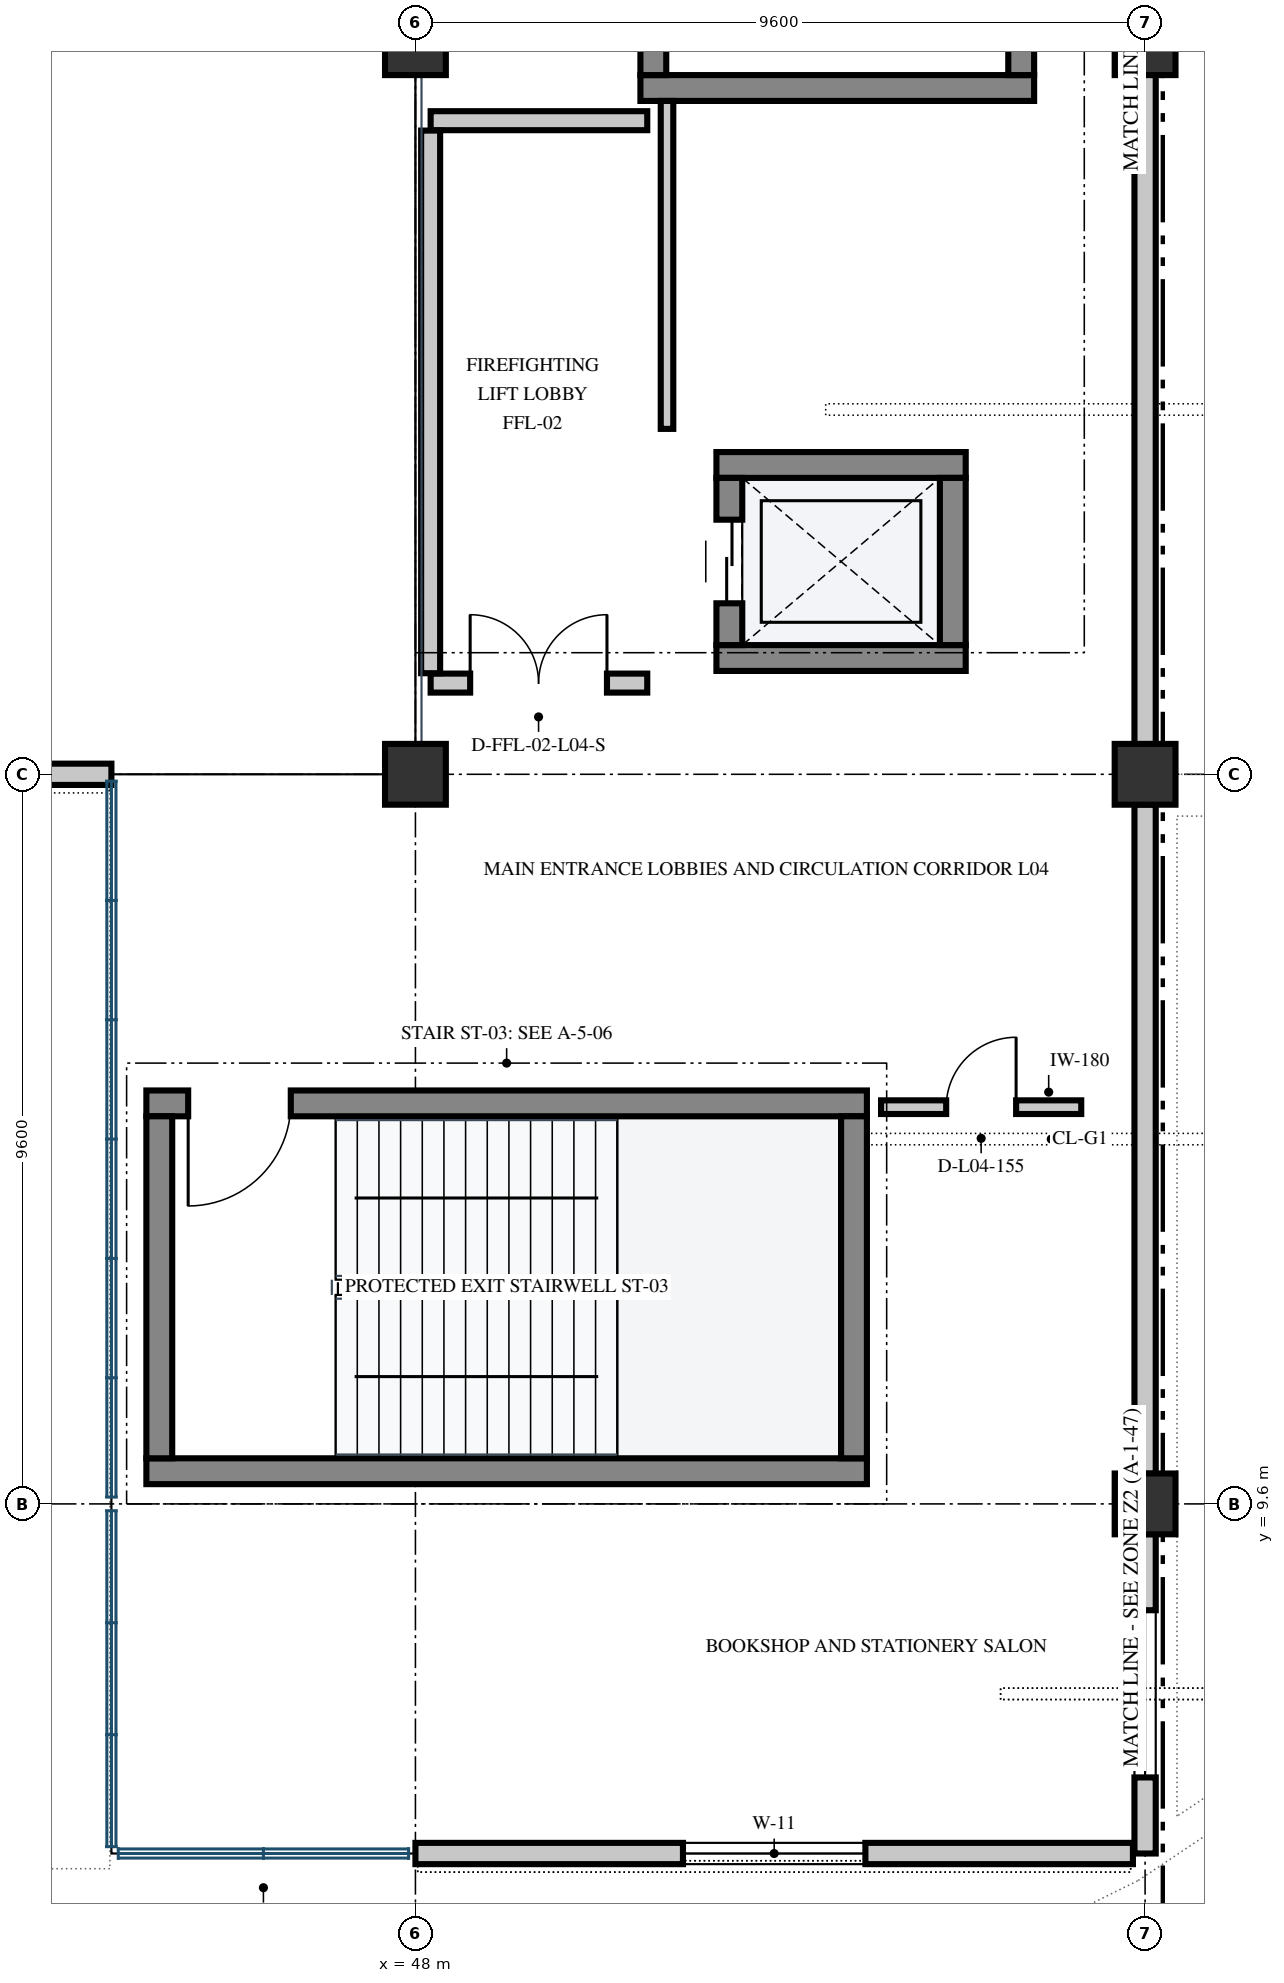
"""IFC4 building model, lengths in metres.
Left out: names, types, materials, properties, quantities, classifications, styles, units other than length and angle.
Written with IfcOpenShell. Run it as: python <this file> out.ifc"""

import sys

from ifc_helpers import new_model, si_unit, direction, frame, frame_2d, origin, origin_2d, place, context, subcontext, project, spatial, rectangle, extrude, element, fill, save


model = new_model("IFC4")
c1 = context("Model", 3, precision=1e-05, world=origin(), true_north=direction((0.0, 1.0)))
c2 = subcontext(c1, "Body", "Model", "MODEL_VIEW")
j1 = project(units=[si_unit("LENGTHUNIT", "METRE"), si_unit("PLANEANGLEUNIT", "RADIAN")], contexts=[c1])
p1 = place(None, origin())
s1 = spatial("IfcSite", under=j1, at=p1, CompositionType="ELEMENT")
p2 = place(p1, origin())
s2 = spatial("IfcBuilding", under=s1, at=p2, CompositionType="ELEMENT")
p3 = place(p2, frame((0.0, 0.0, 19.8)))
s3 = spatial("IfcBuildingStorey", under=s2, at=p3, CompositionType="ELEMENT", Elevation=19.8)
for number, where, z_axis, x_axis in (
    (1, (48.0, 19.2, 0.0), (0.0, 0.0, 1.0), (1.0, 0.0, 0.0)),
    (2, (48.0, 28.8, 0.0), (0.0, 0.0, 1.0), (1.0, 0.0, 0.0)),
    (3, (57.6, 9.6, 0.0), (0.0, 0.0, 1.0), (1.0, 0.0, 0.0)),
    (4, (57.6, 19.2, 0.0), (0.0, 0.0, 1.0), (1.0, 0.0, 0.0)),
    (5, (57.6, 28.8, 0.0), (0.0, 0.0, 1.0), (1.0, 0.0, 0.0)),
):
    element("IfcColumn", number, at=place(p3, frame(where, z_axis=z_axis, x_axis=x_axis)), inside=s3, PredefinedType="COLUMN", context=c2, shape_type="SweptSolid", body=[
        extrude(rectangle(XDim=0.8, YDim=0.8, at=origin_2d()), origin(), (0.0, 0.0, 1.0), 4.8),
    ])
p4 = place(p3, frame((57.6, 28.402, 0.0), z_axis=(0.0, 0.0, 1.0), x_axis=(0.0, -1.0, 0.0)))
e6 = element("IfcWall", 6, at=p4, inside=s3, PredefinedType="SOLIDWALL", context=c2, shape_type="SweptSolid", body=[
    extrude(rectangle(XDim=8.804, YDim=0.28, at=frame_2d((4.402, 0.0))), origin(), (0.0, 0.0, 1.0), 2.67),
])
p5 = place(p3, frame((57.6, 18.802, 0.0), z_axis=(0.0, 0.0, 1.0), x_axis=(0.0, -1.0, 0.0)))
e7 = element("IfcWall", 7, at=p5, inside=s3, PredefinedType="SOLIDWALL", context=c2, shape_type="SweptSolid", body=[
    extrude(rectangle(XDim=8.804, YDim=0.28, at=frame_2d((4.402, 0.0))), origin(), (0.0, 0.0, 1.0), 2.67),
])
p6 = place(p3, frame((57.6, 9.202, 0.0), z_axis=(0.0, 0.0, 1.0), x_axis=(0.0, -1.0, 0.0)))
e8 = element("IfcWall", 8, at=p6, inside=s3, PredefinedType="SOLIDWALL", context=c2, shape_type="SweptSolid", body=[
    extrude(rectangle(XDim=4.202, YDim=0.28, at=frame_2d((2.101, 0.0))), origin(), (0.0, 0.0, 1.0), 4.48),
])
p7 = place(p6, frame((1.001, 0.0, 0.9)))
e9 = element("IfcOpeningElement", 9, at=p7, cuts=e8, PredefinedType="OPENING", context=c2, shape_type="SweptSolid", body=[
    extrude(rectangle(XDim=2.2, YDim=2.4, at=frame_2d((1.1, 1.2))), frame((0.0, 0.152, 0.0), z_axis=(0.0, -1.0, 0.0), x_axis=(1.0, 0.0, 0.0)), (0.0, 0.0, 1.0), 0.304),
])
p8 = place(p3, frame((57.44, 5.0, 0.0), z_axis=(0.0, 0.0, 1.0), x_axis=(-1.0, 0.0, 0.0)))
e10 = element("IfcWall", 10, at=p8, inside=s3, PredefinedType="SOLIDWALL", context=c2, shape_type="SweptSolid", body=[
    extrude(rectangle(XDim=9.44, YDim=0.28, at=frame_2d((4.72, 0.0))), origin(), (0.0, 0.0, 1.0), 4.48),
])
p9 = place(p8, frame((3.52, 0.0, 1.0)))
e11 = element("IfcOpeningElement", 11, at=p9, cuts=e10, PredefinedType="OPENING", context=c2, shape_type="SweptSolid", body=[
    extrude(rectangle(XDim=2.4, YDim=2.1, at=frame_2d((1.2, 1.05))), frame((0.0, 0.152, 0.0), z_axis=(0.0, -1.0, 0.0), x_axis=(1.0, 0.0, 0.0)), (0.0, 0.0, 1.0), 0.304),
])
p10 = place(p3, frame((44.0, 19.2, 0.0), z_axis=(0.0, 0.0, 1.0), x_axis=(-1.0, 0.0, 0.0)))
e12 = element("IfcWall", 12, at=p10, inside=s3, PredefinedType="SOLIDWALL", context=c2, shape_type="SweptSolid", body=[
    extrude(rectangle(XDim=5.202, YDim=0.28, at=frame_2d((2.601, 0.0))), origin(), (0.0, 0.0, 1.0), 2.37),
])
p11 = place(p3, frame((44.46, 10.03, 0.0), z_axis=(0.0, 0.0, 1.0), x_axis=(1.0, 0.0, 0.0)))
e13 = element("IfcWall", 13, at=p11, inside=s3, PredefinedType="SHEAR", context=c2, shape_type="SweptSolid", body=[
    extrude(rectangle(XDim=9.48, YDim=0.34, at=frame_2d((4.74, 0.0))), origin(), (0.0, 0.0, 1.0), 4.48),
])
p12 = place(p3, frame((44.46, 14.87, 0.0), z_axis=(0.0, 0.0, 1.0), x_axis=(1.0, 0.0, 0.0)))
e14 = element("IfcWall", 14, at=p12, inside=s3, PredefinedType="SHEAR", context=c2, shape_type="SweptSolid", body=[
    extrude(rectangle(XDim=9.48, YDim=0.34, at=frame_2d((4.74, 0.0))), origin(), (0.0, 0.0, 1.0), 4.48),
])
p13 = place(p12, frame((0.55, 0.0, 0.0)))
e15 = element("IfcOpeningElement", 15, at=p13, cuts=e14, PredefinedType="OPENING", context=c2, shape_type="SweptSolid", body=[
    extrude(rectangle(XDim=1.35, YDim=2.2, at=frame_2d((0.675, 1.1))), frame((0.0, 0.182, 0.0), z_axis=(0.0, -1.0, 0.0), x_axis=(1.0, 0.0, 0.0)), (0.0, 0.0, 1.0), 0.364),
])
for number, where, z_axis, x_axis in (
    (16, (53.77, 10.2, 0.0), (0.0, 0.0, 1.0), (0.0, 1.0, 0.0)),
    (17, (44.63, 10.2, 0.0), (0.0, 0.0, 1.0), (0.0, 1.0, 0.0)),
):
    element("IfcWall", number, at=place(p3, frame(where, z_axis=z_axis, x_axis=x_axis)), inside=s3, PredefinedType="SHEAR", context=c2, shape_type="SweptSolid", body=[
        extrude(rectangle(XDim=4.5, YDim=0.34, at=frame_2d((2.25, 0.0))), origin(), (0.0, 0.0, 1.0), 4.48),
    ])
p14 = place(p3, frame((50.96, 28.23, 0.0), z_axis=(0.0, 0.0, 1.0), x_axis=(1.0, 0.0, 0.0)))
e18 = element("IfcWall", 18, at=p14, inside=s3, PredefinedType="SHEAR", context=c2, shape_type="SweptSolid", body=[
    extrude(rectangle(XDim=5.18, YDim=0.34, at=frame_2d((2.59, 0.0))), origin(), (0.0, 0.0, 1.0), 4.48),
])
p15 = place(p3, frame((55.97, 28.4, 0.0), z_axis=(0.0, 0.0, 1.0), x_axis=(0.0, 1.0, 0.0)))
e19 = element("IfcWall", 19, at=p15, inside=s3, PredefinedType="SHEAR", context=c2, shape_type="SweptSolid", body=[
    extrude(rectangle(XDim=8.8, YDim=0.34, at=frame_2d((4.4, 0.0))), origin(), (0.0, 0.0, 1.0), 4.48),
])
p16 = place(p3, frame((51.13, 28.4, 0.0), z_axis=(0.0, 0.0, 1.0), x_axis=(0.0, 1.0, 0.0)))
e20 = element("IfcWall", 20, at=p16, inside=s3, PredefinedType="SHEAR", context=c2, shape_type="SweptSolid", body=[
    extrude(rectangle(XDim=8.8, YDim=0.34, at=frame_2d((4.4, 0.0))), origin(), (0.0, 0.0, 1.0), 4.48),
])
p17 = place(p16, frame((0.45, 0.0, 0.0)))
e21 = element("IfcOpeningElement", 21, at=p17, cuts=e20, PredefinedType="OPENING", context=c2, shape_type="SweptSolid", body=[
    extrude(rectangle(XDim=1.35, YDim=2.2, at=frame_2d((0.675, 1.1))), frame((0.0, 0.182, 0.0), z_axis=(0.0, -1.0, 0.0), x_axis=(1.0, 0.0, 0.0)), (0.0, 0.0, 1.0), 0.364),
])
for number, where, z_axis, x_axis in (
    (22, (51.96, 20.73, 0.0), (0.0, 0.0, 1.0), (1.0, 0.0, 0.0)),
    (23, (51.96, 23.27, 0.0), (0.0, 0.0, 1.0), (1.0, 0.0, 0.0)),
):
    element("IfcWall", number, at=place(p3, frame(where, z_axis=z_axis, x_axis=x_axis)), inside=s3, PredefinedType="SHEAR", context=c2, shape_type="SweptSolid", body=[
        extrude(rectangle(XDim=3.28, YDim=0.34, at=frame_2d((1.64, 0.0))), origin(), (0.0, 0.0, 1.0), 4.48),
    ])
p18 = place(p3, frame((52.13, 20.9, 0.0), z_axis=(0.0, 0.0, 1.0), x_axis=(0.0, 1.0, 0.0)))
e24 = element("IfcWall", 24, at=p18, inside=s3, PredefinedType="SHEAR", context=c2, shape_type="SweptSolid", body=[
    extrude(rectangle(XDim=2.2, YDim=0.34, at=frame_2d((1.1, 0.0))), origin(), (0.0, 0.0, 1.0), 4.48),
])
p19 = place(p18, frame((0.55, 0.0, 0.0)))
e25 = element("IfcOpeningElement", 25, at=p19, cuts=e24, PredefinedType="OPENING", context=c2, shape_type="SweptSolid", body=[
    extrude(rectangle(XDim=1.1, YDim=2.15, at=frame_2d((0.55, 1.075))), frame((0.0, 0.182, 0.0), z_axis=(0.0, -1.0, 0.0), x_axis=(1.0, 0.0, 0.0)), (0.0, 0.0, 1.0), 0.364),
])
p20 = place(p3, frame((55.07, 20.9, 0.0), z_axis=(0.0, 0.0, 1.0), x_axis=(0.0, 1.0, 0.0)))
e26 = element("IfcWall", 26, at=p20, inside=s3, PredefinedType="SHEAR", context=c2, shape_type="SweptSolid", body=[
    extrude(rectangle(XDim=2.2, YDim=0.34, at=frame_2d((1.1, 0.0))), origin(), (0.0, 0.0, 1.0), 4.48),
])
p21 = place(p3, frame((48.2, 20.4, 0.0), z_axis=(0.0, 0.0, 1.0), x_axis=(1.0, 0.0, 0.0)))
e27 = element("IfcWall", 27, at=p21, inside=s3, PredefinedType="PARTITIONING", context=c2, shape_type="SweptSolid", body=[
    extrude(rectangle(XDim=2.85, YDim=0.25, at=frame_2d((1.425, 0.0))), origin(), (0.0, 0.0, 1.0), 3.42),
])
p22 = place(p21, frame((0.52, 0.0, 0.0)))
e28 = element("IfcOpeningElement", 28, at=p22, cuts=e27, PredefinedType="OPENING", context=c2, shape_type="SweptSolid", body=[
    extrude(rectangle(XDim=1.8, YDim=2.25, at=frame_2d((0.9, 1.125))), frame((0.0, 0.137, 0.0), z_axis=(0.0, -1.0, 0.0), x_axis=(1.0, 0.0, 0.0)), (0.0, 0.0, 1.0), 0.274),
])
p23 = place(p3, frame((48.2, 27.8, 0.0), z_axis=(0.0, 0.0, 1.0), x_axis=(1.0, 0.0, 0.0)))
e29 = element("IfcWall", 29, at=p23, inside=s3, PredefinedType="PARTITIONING", context=c2, shape_type="SweptSolid", body=[
    extrude(rectangle(XDim=2.85, YDim=0.25, at=frame_2d((1.425, 0.0))), origin(), (0.0, 0.0, 1.0), 3.42),
])
p24 = place(p3, frame((48.2, 20.53, 0.0), z_axis=(0.0, 0.0, 1.0), x_axis=(0.0, 1.0, 0.0)))
e30 = element("IfcWall", 30, at=p24, inside=s3, PredefinedType="PARTITIONING", context=c2, shape_type="SweptSolid", body=[
    extrude(rectangle(XDim=7.14, YDim=0.25, at=frame_2d((3.57, 0.0))), origin(), (0.0, 0.0, 1.0), 3.42),
])
p25 = place(p3, frame((54.126, 14.82, 0.0), z_axis=(0.0, 0.0, 1.0), x_axis=(1.0, 0.0, 0.0)))
e31 = element("IfcWall", 31, at=p25, inside=s3, PredefinedType="PARTITIONING", context=c2, shape_type="SweptSolid", body=[
    extrude(rectangle(XDim=2.634, YDim=0.18, at=frame_2d((1.317, 0.0))), origin(), (0.0, 0.0, 1.0), 4.48),
])
p26 = place(p25, frame((0.857, 0.0, 0.0)))
e32 = element("IfcOpeningElement", 32, at=p26, cuts=e31, PredefinedType="OPENING", context=c2, shape_type="SweptSolid", body=[
    extrude(rectangle(XDim=0.92, YDim=2.1, at=frame_2d((0.46, 1.05))), frame((0.0, 0.102, 0.0), z_axis=(0.0, -1.0, 0.0), x_axis=(1.0, 0.0, 0.0)), (0.0, 0.0, 1.0), 0.204),
])
p27 = place(p3, frame((51.31, 23.745, 0.0), z_axis=(0.0, 0.0, 1.0), x_axis=(0.0, 1.0, 0.0)))
e33 = element("IfcWall", 33, at=p27, inside=s3, PredefinedType="PARTITIONING", context=c2, shape_type="SweptSolid", body=[
    extrude(rectangle(XDim=4.315, YDim=0.165, at=frame_2d((2.158, 0.0))), origin(), (0.0, 0.0, 1.0), 4.48),
])
p28 = place(p7, origin())
e34 = element("IfcWindow", 34, at=p28, inside=s3, PartitioningType="SINGLE_PANEL", PredefinedType="WINDOW", context=c2, shape_type="SweptSolid", body=[
    extrude(rectangle(XDim=2.2, YDim=2.4, at=frame_2d((1.1, 1.2))), frame((0.0, 0.03, 0.0), z_axis=(0.0, -1.0, 0.0), x_axis=(1.0, 0.0, 0.0)), (0.0, 0.0, 1.0), 0.06),
])
fill(e9, e34)
p29 = place(p9, origin())
e35 = element("IfcWindow", 35, at=p29, inside=s3, PartitioningType="SINGLE_PANEL", PredefinedType="WINDOW", context=c2, shape_type="SweptSolid", body=[
    extrude(rectangle(XDim=2.4, YDim=2.1, at=frame_2d((1.2, 1.05))), frame((0.0, 0.03, 0.0), z_axis=(0.0, -1.0, 0.0), x_axis=(1.0, 0.0, 0.0)), (0.0, 0.0, 1.0), 0.06),
])
fill(e11, e35)
p30 = place(p13, frame((1.35, 0.0, 0.0), z_axis=(0.0, 0.0, 1.0), x_axis=(-1.0, 0.0, 0.0)))
e36 = element("IfcDoor", 36, at=p30, inside=s3, OperationType="SINGLE_SWING_RIGHT", PredefinedType="DOOR", context=c2, shape_type="SweptSolid", body=[
    extrude(rectangle(XDim=1.35, YDim=2.2, at=frame_2d((0.675, 1.1))), frame((0.0, 0.025, 0.0), z_axis=(0.0, -1.0, 0.0), x_axis=(1.0, 0.0, 0.0)), (0.0, 0.0, 1.0), 0.05),
])
fill(e15, e36)
p31 = place(p19, origin())
e37 = element("IfcDoor", 37, at=p31, inside=s3, OperationType="DOUBLE_DOOR_SLIDING", PredefinedType="DOOR", context=c2, shape_type="SweptSolid", body=[
    extrude(rectangle(XDim=1.1, YDim=2.15, at=frame_2d((0.55, 1.075))), frame((0.0, 0.025, 0.0), z_axis=(0.0, -1.0, 0.0), x_axis=(1.0, 0.0, 0.0)), (0.0, 0.0, 1.0), 0.05),
])
fill(e25, e37)
p32 = place(p22, origin())
e38 = element("IfcDoor", 38, at=p32, inside=s3, OperationType="DOUBLE_DOOR_SINGLE_SWING", PredefinedType="DOOR", context=c2, shape_type="SweptSolid", body=[
    extrude(rectangle(XDim=1.8, YDim=2.25, at=frame_2d((0.9, 1.125))), frame((0.0, 0.025, 0.0), z_axis=(0.0, -1.0, 0.0), x_axis=(1.0, 0.0, 0.0)), (0.0, 0.0, 1.0), 0.05),
])
fill(e28, e38)
p33 = place(p26, origin())
e39 = element("IfcDoor", 39, at=p33, inside=s3, OperationType="SINGLE_SWING_RIGHT", PredefinedType="DOOR", context=c2, shape_type="SweptSolid", body=[
    extrude(rectangle(XDim=0.92, YDim=2.1, at=frame_2d((0.46, 1.05))), frame((0.0, 0.025, 0.0), z_axis=(0.0, -1.0, 0.0), x_axis=(1.0, 0.0, 0.0)), (0.0, 0.0, 1.0), 0.05),
])
fill(e32, e39)
save(model, sys.argv[1])
